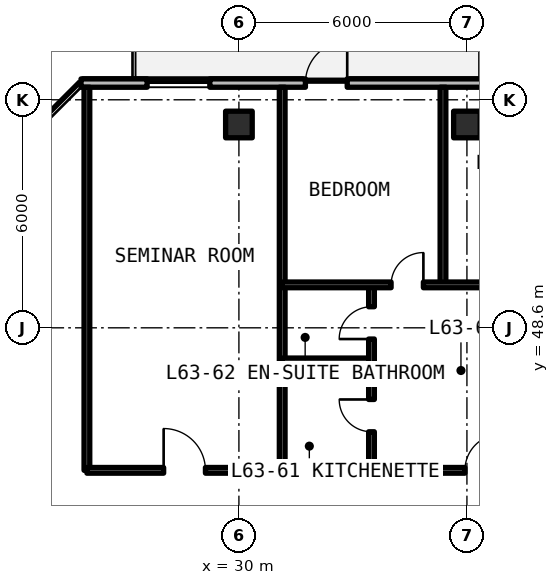
"""IFC4 building model, lengths in metres.
Left out: names, types, materials, properties, quantities, classifications, styles, units other than length and angle.
Written with IfcOpenShell. Run it as: python <this file> out.ifc"""

import sys

from ifc_helpers import new_model, si_unit, direction, frame, frame_2d, origin, origin_2d, place, context, subcontext, project, spatial, rectangle, extrude, element, fill, save


model = new_model("IFC4")
c1 = context("Model", 3, precision=1e-05, world=origin(), true_north=direction((0.0, 1.0)))
c2 = subcontext(c1, "Body", "Model", "MODEL_VIEW")
j1 = project(units=[si_unit("LENGTHUNIT", "METRE"), si_unit("PLANEANGLEUNIT", "RADIAN")], contexts=[c1])
p1 = place(None, origin())
s1 = spatial("IfcSite", under=j1, at=p1, CompositionType="ELEMENT")
p2 = place(p1, origin())
s2 = spatial("IfcBuilding", under=s1, at=p2, CompositionType="ELEMENT")
p3 = place(p2, frame((0.0, 0.0, 226.05)))
s3 = spatial("IfcBuildingStorey", under=s2, at=p3, CompositionType="ELEMENT", Elevation=226.05)
for number, where, z_axis, x_axis in (
    (1, (30.0, 53.95, 0.0), (0.0, 0.0, 1.0), (1.0, 0.0, 0.0)),
    (2, (36.0, 53.95, 0.0), (0.0, 0.0, 1.0), (1.0, 0.0, 0.0)),
):
    element("IfcColumn", number, at=place(p3, frame(where, z_axis=z_axis, x_axis=x_axis)), inside=s3, PredefinedType="COLUMN", context=c2, shape_type="SweptSolid", body=[
        extrude(rectangle(XDim=0.7, YDim=0.7, at=origin_2d()), origin(), (0.0, 0.0, 1.0), 3.02),
    ])
p4 = place(p3, frame((43.49, 55.04, 0.0), z_axis=(0.0, 0.0, 1.0), x_axis=(-1.0, 0.0, 0.0)))
e3 = element("IfcWall", 3, at=p4, inside=s3, PredefinedType="SOLIDWALL", context=c2, shape_type="SweptSolid", body=[
    extrude(rectangle(XDim=17.644, YDim=0.22, at=frame_2d((8.822, 0.0))), origin(), (0.0, 0.0, 1.0), 3.02),
])
p5 = place(p4, frame((10.64, 0.0, 0.0)))
e4 = element("IfcOpeningElement", 4, at=p5, cuts=e3, PredefinedType="OPENING", context=c2, shape_type="SweptSolid", body=[
    extrude(rectangle(XDim=1.1, YDim=2.15, at=frame_2d((0.55, 1.075))), frame((0.0, 0.12, 0.0), z_axis=(0.0, -1.0, 0.0), x_axis=(1.0, 0.0, 0.0)), (0.0, 0.0, 1.0), 0.24),
])
p6 = place(p4, frame((14.256, 0.0, 0.78)))
e5 = element("IfcOpeningElement", 5, at=p6, cuts=e3, PredefinedType="OPENING", context=c2, shape_type="SweptSolid", body=[
    extrude(rectangle(XDim=1.65, YDim=1.66, at=frame_2d((0.825, 0.83))), frame((0.0, 0.12, 0.0), z_axis=(0.0, -1.0, 0.0), x_axis=(1.0, 0.0, 0.0)), (0.0, 0.0, 1.0), 0.24),
])
p7 = place(p4, frame((5.032, 0.0, 0.78)))
e6 = element("IfcOpeningElement", 6, at=p7, cuts=e3, PredefinedType="OPENING", context=c2, shape_type="SweptSolid", body=[
    extrude(rectangle(XDim=1.65, YDim=1.66, at=frame_2d((0.825, 0.83))), frame((0.0, 0.12, 0.0), z_axis=(0.0, -1.0, 0.0), x_axis=(1.0, 0.0, 0.0)), (0.0, 0.0, 1.0), 0.24),
])
p8 = place(p4, frame((2.327, 0.0, 0.78)))
e7 = element("IfcOpeningElement", 7, at=p8, cuts=e3, PredefinedType="OPENING", context=c2, shape_type="SweptSolid", body=[
    extrude(rectangle(XDim=0.85, YDim=1.65, at=frame_2d((0.425, 0.825))), frame((0.0, 0.12, 0.0), z_axis=(0.0, -1.0, 0.0), x_axis=(1.0, 0.0, 0.0)), (0.0, 0.0, 1.0), 0.24),
])
for number, where, z_axis, x_axis in (
    (8, (26.0, 44.85, 0.0), (0.0, 0.0, 1.0), (0.0, 1.0, 0.0)),
    (9, (31.139, 44.85, 0.0), (0.0, 0.0, 1.0), (0.0, 1.0, 0.0)),
):
    element("IfcWall", number, at=place(p3, frame(where, z_axis=z_axis, x_axis=x_axis)), inside=s3, PredefinedType="SOLIDWALL", context=c2, shape_type="SweptSolid", body=[
        extrude(rectangle(XDim=10.08, YDim=0.15, at=frame_2d((5.04, 0.0))), origin(), (0.0, 0.0, 1.0), 2.35),
    ])
p9 = place(p3, frame((26.0, 44.85, 0.0), z_axis=(0.0, 0.0, 1.0), x_axis=(1.0, 0.0, 0.0)))
e10 = element("IfcWall", 10, at=p9, inside=s3, PredefinedType="SOLIDWALL", context=c2, shape_type="SweptSolid", body=[
    extrude(rectangle(XDim=5.139, YDim=0.15, at=frame_2d((2.569, 0.0))), origin(), (0.0, 0.0, 1.0), 2.35),
])
p10 = place(p9, frame((2.019, 0.0, 0.0)))
e11 = element("IfcOpeningElement", 11, at=p10, cuts=e10, PredefinedType="OPENING", context=c2, shape_type="SweptSolid", body=[
    extrude(rectangle(XDim=1.1, YDim=2.15, at=frame_2d((0.55, 1.075))), frame((0.0, 0.085, 0.0), z_axis=(0.0, -1.0, 0.0), x_axis=(1.0, 0.0, 0.0)), (0.0, 0.0, 1.0), 0.17),
])
p11 = place(p3, frame((31.139, 47.729, 0.0), z_axis=(0.0, 0.0, 1.0), x_axis=(1.0, 0.0, 0.0)))
e12 = element("IfcWall", 12, at=p11, inside=s3, PredefinedType="PARTITIONING", context=c2, shape_type="SweptSolid", body=[
    extrude(rectangle(XDim=2.35, YDim=0.15, at=frame_2d((1.175, 0.0))), origin(), (0.0, 0.0, 1.0), 2.35),
])
p12 = place(p3, frame((33.489, 44.85, 0.0), z_axis=(0.0, 0.0, 1.0), x_axis=(0.0, 1.0, 0.0)))
e13 = element("IfcWall", 13, at=p12, inside=s3, PredefinedType="PARTITIONING", context=c2, shape_type="SweptSolid", body=[
    extrude(rectangle(XDim=4.88, YDim=0.15, at=frame_2d((2.44, 0.0))), origin(), (0.0, 0.0, 1.0), 2.35),
])
p13 = place(p12, frame((1.015, 0.0, 0.0)))
e14 = element("IfcOpeningElement", 14, at=p13, cuts=e13, PredefinedType="OPENING", context=c2, shape_type="SweptSolid", body=[
    extrude(rectangle(XDim=0.85, YDim=2.1, at=frame_2d((0.425, 1.05))), frame((0.0, 0.085, 0.0), z_axis=(0.0, -1.0, 0.0), x_axis=(1.0, 0.0, 0.0)), (0.0, 0.0, 1.0), 0.17),
])
p14 = place(p12, frame((3.455, 0.0, 0.0)))
e15 = element("IfcOpeningElement", 15, at=p14, cuts=e13, PredefinedType="OPENING", context=c2, shape_type="SweptSolid", body=[
    extrude(rectangle(XDim=0.85, YDim=2.1, at=frame_2d((0.425, 1.05))), frame((0.0, 0.085, 0.0), z_axis=(0.0, -1.0, 0.0), x_axis=(1.0, 0.0, 0.0)), (0.0, 0.0, 1.0), 0.17),
])
p15 = place(p3, frame((35.37, 49.73, 0.0), z_axis=(0.0, 0.0, 1.0), x_axis=(0.0, 1.0, 0.0)))
e16 = element("IfcWall", 16, at=p15, inside=s3, PredefinedType="PARTITIONING", context=c2, shape_type="SweptSolid", body=[
    extrude(rectangle(XDim=5.2, YDim=0.15, at=frame_2d((2.6, 0.0))), origin(), (0.0, 0.0, 1.0), 2.35),
])
p16 = place(p3, frame((31.139, 49.73, 0.0), z_axis=(0.0, 0.0, 1.0), x_axis=(1.0, 0.0, 0.0)))
e17 = element("IfcWall", 17, at=p16, inside=s3, PredefinedType="PARTITIONING", context=c2, shape_type="SweptSolid", body=[
    extrude(rectangle(XDim=8.136, YDim=0.15, at=frame_2d((4.068, 0.0))), origin(), (0.0, 0.0, 1.0), 2.35),
])
p17 = place(p16, frame((2.865, 0.0, 0.0)))
e18 = element("IfcOpeningElement", 18, at=p17, cuts=e17, PredefinedType="OPENING", context=c2, shape_type="SweptSolid", body=[
    extrude(rectangle(XDim=0.85, YDim=2.1, at=frame_2d((0.425, 1.05))), frame((0.0, 0.085, 0.0), z_axis=(0.0, -1.0, 0.0), x_axis=(1.0, 0.0, 0.0)), (0.0, 0.0, 1.0), 0.17),
])
p18 = place(p16, frame((5.759, 0.0, 0.0)))
e19 = element("IfcOpeningElement", 19, at=p18, cuts=e17, PredefinedType="OPENING", context=c2, shape_type="SweptSolid", body=[
    extrude(rectangle(XDim=0.85, YDim=2.1, at=frame_2d((0.425, 1.05))), frame((0.0, 0.085, 0.0), z_axis=(0.0, -1.0, 0.0), x_axis=(1.0, 0.0, 0.0)), (0.0, 0.0, 1.0), 0.17),
])
p19 = place(p3, frame((31.139, 44.85, 0.0), z_axis=(0.0, 0.0, 1.0), x_axis=(1.0, 0.0, 0.0)))
e20 = element("IfcWall", 20, at=p19, inside=s3, PredefinedType="SOLIDWALL", context=c2, shape_type="SweptSolid", body=[
    extrude(rectangle(XDim=8.136, YDim=0.15, at=frame_2d((4.068, 0.0))), origin(), (0.0, 0.0, 1.0), 2.35),
])
p20 = place(p19, frame((4.808, 0.0, 0.0)))
e21 = element("IfcOpeningElement", 21, at=p20, cuts=e20, PredefinedType="OPENING", context=c2, shape_type="SweptSolid", body=[
    extrude(rectangle(XDim=0.95, YDim=2.15, at=frame_2d((0.475, 1.075))), frame((0.0, 0.085, 0.0), z_axis=(0.0, -1.0, 0.0), x_axis=(1.0, 0.0, 0.0)), (0.0, 0.0, 1.0), 0.17),
])
p21 = place(p5, frame((1.1, 0.0, 0.0), z_axis=(0.0, 0.0, 1.0), x_axis=(-1.0, 0.0, 0.0)))
e22 = element("IfcDoor", 22, at=p21, inside=s3, OperationType="SINGLE_SWING_RIGHT", PredefinedType="DOOR", context=c2, shape_type="SweptSolid", body=[
    extrude(rectangle(XDim=1.1, YDim=2.15, at=frame_2d((0.55, 1.075))), frame((0.0, 0.025, 0.0), z_axis=(0.0, -1.0, 0.0), x_axis=(1.0, 0.0, 0.0)), (0.0, 0.0, 1.0), 0.05),
])
fill(e4, e22)
p22 = place(p6, origin())
e23 = element("IfcWindow", 23, at=p22, inside=s3, PartitioningType="SINGLE_PANEL", PredefinedType="WINDOW", context=c2, shape_type="SweptSolid", body=[
    extrude(rectangle(XDim=1.65, YDim=1.66, at=frame_2d((0.825, 0.83))), frame((0.0, 0.03, 0.0), z_axis=(0.0, -1.0, 0.0), x_axis=(1.0, 0.0, 0.0)), (0.0, 0.0, 1.0), 0.06),
])
fill(e5, e23)
p23 = place(p10, origin())
e24 = element("IfcDoor", 24, at=p23, inside=s3, OperationType="SINGLE_SWING_LEFT", PredefinedType="DOOR", context=c2, shape_type="SweptSolid", body=[
    extrude(rectangle(XDim=1.1, YDim=2.15, at=frame_2d((0.55, 1.075))), frame((0.0, 0.025, 0.0), z_axis=(0.0, -1.0, 0.0), x_axis=(1.0, 0.0, 0.0)), (0.0, 0.0, 1.0), 0.05),
])
fill(e11, e24)
p24 = place(p13, origin())
e25 = element("IfcDoor", 25, at=p24, inside=s3, OperationType="SINGLE_SWING_RIGHT", PredefinedType="DOOR", context=c2, shape_type="SweptSolid", body=[
    extrude(rectangle(XDim=0.85, YDim=2.1, at=frame_2d((0.425, 1.05))), frame((0.0, 0.025, 0.0), z_axis=(0.0, -1.0, 0.0), x_axis=(1.0, 0.0, 0.0)), (0.0, 0.0, 1.0), 0.05),
])
fill(e14, e25)
p25 = place(p14, origin())
e26 = element("IfcDoor", 26, at=p25, inside=s3, OperationType="SINGLE_SWING_LEFT", PredefinedType="DOOR", context=c2, shape_type="SweptSolid", body=[
    extrude(rectangle(XDim=0.85, YDim=2.1, at=frame_2d((0.425, 1.05))), frame((0.0, 0.025, 0.0), z_axis=(0.0, -1.0, 0.0), x_axis=(1.0, 0.0, 0.0)), (0.0, 0.0, 1.0), 0.05),
])
fill(e15, e26)
p26 = place(p17, origin())
e27 = element("IfcDoor", 27, at=p26, inside=s3, OperationType="SINGLE_SWING_RIGHT", PredefinedType="DOOR", context=c2, shape_type="SweptSolid", body=[
    extrude(rectangle(XDim=0.85, YDim=2.1, at=frame_2d((0.425, 1.05))), frame((0.0, 0.025, 0.0), z_axis=(0.0, -1.0, 0.0), x_axis=(1.0, 0.0, 0.0)), (0.0, 0.0, 1.0), 0.05),
])
fill(e18, e27)
p27 = place(p20, origin())
e28 = element("IfcDoor", 28, at=p27, inside=s3, OperationType="SINGLE_SWING_RIGHT", PredefinedType="DOOR", context=c2, shape_type="SweptSolid", body=[
    extrude(rectangle(XDim=0.95, YDim=2.15, at=frame_2d((0.475, 1.075))), frame((0.0, 0.025, 0.0), z_axis=(0.0, -1.0, 0.0), x_axis=(1.0, 0.0, 0.0)), (0.0, 0.0, 1.0), 0.05),
])
fill(e21, e28)
save(model, sys.argv[1])
